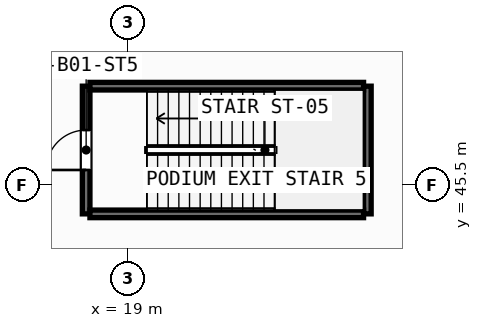
"""IFC4 building model, lengths in metres.
Left out: names, types, materials, properties, quantities, classifications, styles, units other than length and angle.
Written with IfcOpenShell. Run it as: python <this file> out.ifc"""

import sys

from ifc_helpers import new_model, si_unit, direction, frame, frame_2d, origin, place, context, subcontext, project, spatial, rectangle, extrude, source, transform, mapped, element, fill, save


model = new_model("IFC4")
c1 = context("Model", 3, precision=1e-05, world=origin(), true_north=direction((0.0, 1.0)))
c2 = subcontext(c1, "Body", "Model", "MODEL_VIEW")
j1 = project(units=[si_unit("LENGTHUNIT", "METRE"), si_unit("PLANEANGLEUNIT", "RADIAN")], contexts=[c1])
p1 = place(None, origin())
s1 = spatial("IfcSite", under=j1, at=p1, CompositionType="ELEMENT")
p2 = place(p1, origin())
s2 = spatial("IfcBuilding", under=s1, at=p2, CompositionType="ELEMENT")
p3 = place(p2, frame((0.0, 0.0, -4.5)))
s3 = spatial("IfcBuildingStorey", under=s2, at=p3, CompositionType="ELEMENT", Elevation=-4.5)
p4 = place(p3, frame((17.9, 44.74, 0.0), z_axis=(0.0, 0.0, 1.0), x_axis=(0.0, 1.0, 0.0)))
e1 = element("IfcWall", 1, at=p4, inside=s3, PredefinedType="SHEAR", context=c2, shape_type="SweptSolid", body=[
    extrude(rectangle(XDim=3.36, YDim=0.2, at=frame_2d((1.68, 0.0))), origin(), (0.0, 0.0, 1.0), 4.25),
])
p5 = place(p4, frame((1.155, 0.0, 0.0)))
e2 = element("IfcOpeningElement", 2, at=p5, cuts=e1, PredefinedType="OPENING", context=c2, shape_type="SweptSolid", body=[
    extrude(rectangle(XDim=1.05, YDim=2.15, at=frame_2d((0.525, 1.075))), frame((0.0, 0.11, 0.0), z_axis=(0.0, -1.0, 0.0), x_axis=(1.0, 0.0, 0.0)), (0.0, 0.0, 1.0), 0.22),
])
p6 = place(p3, frame((25.3, 48.1, 0.0), z_axis=(0.0, 0.0, 1.0), x_axis=(0.0, -1.0, 0.0)))
e3 = element("IfcWall", 3, at=p6, inside=s3, PredefinedType="SHEAR", context=c2, shape_type="SweptSolid", body=[
    extrude(rectangle(XDim=3.36, YDim=0.2, at=frame_2d((1.68, 0.0))), origin(), (0.0, 0.0, 1.0), 4.25),
])
for number, where, z_axis, x_axis in (
    (4, (25.2, 44.74, 0.0), (0.0, 0.0, 1.0), (-1.0, 0.0, 0.0)),
    (5, (18.0, 48.1, 0.0), (0.0, 0.0, 1.0), (1.0, 0.0, 0.0)),
):
    element("IfcWall", number, at=place(p3, frame(where, z_axis=z_axis, x_axis=x_axis)), inside=s3, PredefinedType="SHEAR", context=c2, shape_type="SweptSolid", body=[
        extrude(rectangle(XDim=7.2, YDim=0.2, at=frame_2d((3.6, 0.0))), origin(), (0.0, 0.0, 1.0), 4.25),
    ])
m1 = source(origin(), c2, "Body", "SweptSolid", [
    extrude(rectangle(XDim=1.05, YDim=2.15, at=frame_2d((0.525, 1.075))), frame((0.0, 0.025, 0.0), z_axis=(0.0, -1.0, 0.0), x_axis=(1.0, 0.0, 0.0)), (0.0, 0.0, 1.0), 0.05),
])
p7 = place(p5, origin())
e6 = element("IfcDoor", 6, at=p7, inside=s3, OperationType="SINGLE_SWING_LEFT", PredefinedType="DOOR", context=c2, shape_type="MappedRepresentation", body=[
    mapped(m1, transform((0.0, 0.0, 0.0), scale=1.0)),
])
fill(e2, e6)
save(model, sys.argv[1])
